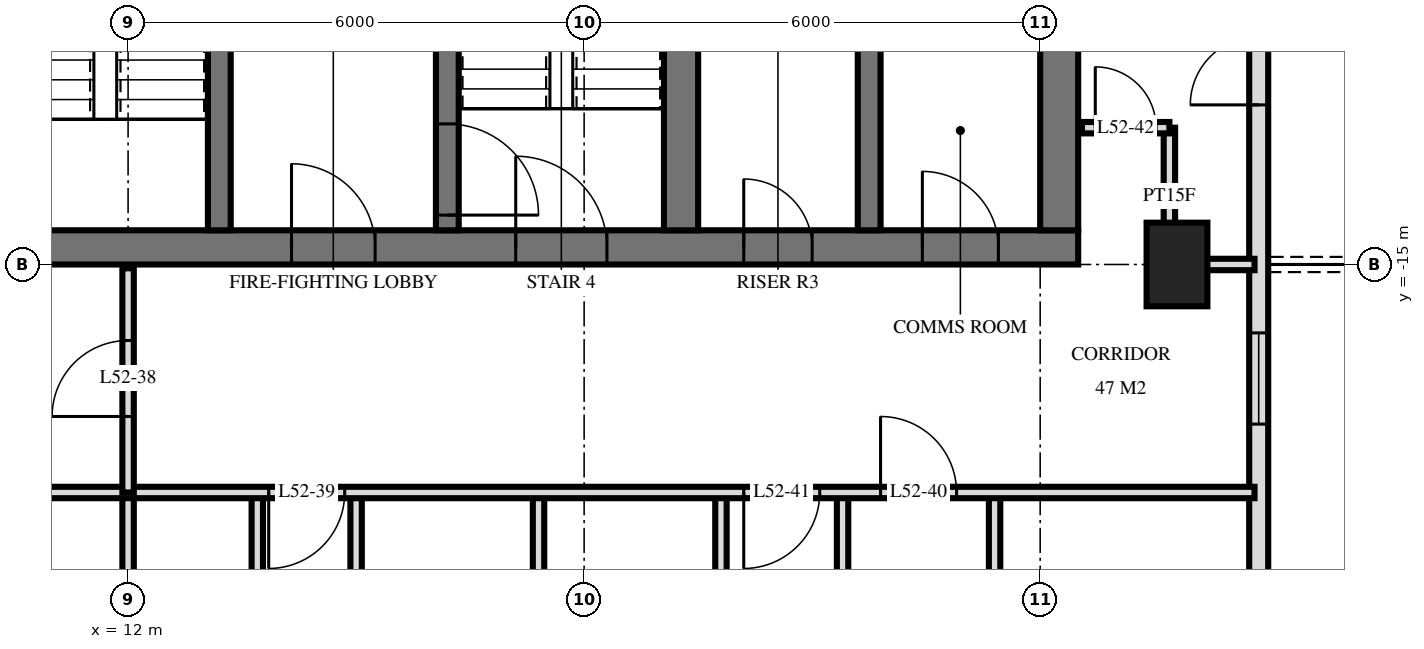
"""IFC4 building model, lengths in metres.
Left out: names, types, materials, properties, quantities, classifications, styles, units other than length and angle.
Written with IfcOpenShell. Run it as: python <this file> out.ifc"""

import sys

from ifc_helpers import new_model, si_unit, direction, frame, frame_2d, origin, origin_2d, place, context, subcontext, project, spatial, rectangle, extrude, element, fill, save


model = new_model("IFC4")
c1 = context("Model", 3, precision=1e-05, world=origin(), true_north=direction((0.0, 1.0)))
c2 = subcontext(c1, "Body", "Model", "MODEL_VIEW")
j1 = project(units=[si_unit("LENGTHUNIT", "METRE"), si_unit("PLANEANGLEUNIT", "RADIAN")], contexts=[c1])
p1 = place(None, origin())
s1 = spatial("IfcSite", under=j1, at=p1, CompositionType="ELEMENT")
p2 = place(p1, origin())
s2 = spatial("IfcBuilding", under=s1, at=p2, CompositionType="ELEMENT")
p3 = place(p2, frame((0.0, 0.0, 201.1)))
s3 = spatial("IfcBuildingStorey", under=s2, at=p3, CompositionType="ELEMENT", Elevation=201.1)
p4 = place(p3, frame((25.8, -15.0, 0.0), z_axis=(0.0, 0.0, 1.0), x_axis=(0.0, 1.0, 0.0)))
e1 = element("IfcColumn", 1, at=p4, inside=s3, PredefinedType="COLUMN", context=c2, shape_type="SweptSolid", body=[
    extrude(rectangle(XDim=1.1, YDim=0.8, at=origin_2d()), origin(), (0.0, 0.0, 1.0), 3.5),
])
p5 = place(p3, frame((10.0, -14.775, 0.0), z_axis=(0.0, 0.0, 1.0), x_axis=(1.0, 0.0, 0.0)))
e2 = element("IfcWall", 2, at=p5, inside=s3, PredefinedType="SHEAR", context=c2, shape_type="SweptSolid", body=[
    extrude(rectangle(XDim=14.5, YDim=0.45, at=frame_2d((7.25, 0.0))), origin(), (0.0, 0.0, 1.0), 3.5),
])
p6 = place(p5, frame((7.1, 0.0, 0.0)))
e3 = element("IfcOpeningElement", 3, at=p6, cuts=e2, PredefinedType="OPENING", context=c2, shape_type="SweptSolid", body=[
    extrude(rectangle(XDim=1.2, YDim=2.1, at=frame_2d((0.6, 1.05))), frame((0.0, 0.235, 0.0), z_axis=(0.0, -1.0, 0.0), x_axis=(1.0, 0.0, 0.0)), (0.0, 0.0, 1.0), 0.47),
])
p7 = place(p5, frame((4.15, 0.0, 0.0)))
e4 = element("IfcOpeningElement", 4, at=p7, cuts=e2, PredefinedType="OPENING", context=c2, shape_type="SweptSolid", body=[
    extrude(rectangle(XDim=1.1, YDim=2.1, at=frame_2d((0.55, 1.05))), frame((0.0, 0.235, 0.0), z_axis=(0.0, -1.0, 0.0), x_axis=(1.0, 0.0, 0.0)), (0.0, 0.0, 1.0), 0.47),
])
p8 = place(p5, frame((10.1, 0.0, 0.0)))
e5 = element("IfcOpeningElement", 5, at=p8, cuts=e2, PredefinedType="OPENING", context=c2, shape_type="SweptSolid", body=[
    extrude(rectangle(XDim=0.9, YDim=2.1, at=frame_2d((0.45, 1.05))), frame((0.0, 0.235, 0.0), z_axis=(0.0, -1.0, 0.0), x_axis=(1.0, 0.0, 0.0)), (0.0, 0.0, 1.0), 0.47),
])
p9 = place(p5, frame((12.45, 0.0, 0.0)))
e6 = element("IfcOpeningElement", 6, at=p9, cuts=e2, PredefinedType="OPENING", context=c2, shape_type="SweptSolid", body=[
    extrude(rectangle(XDim=1.0, YDim=2.1, at=frame_2d((0.5, 1.05))), frame((0.0, 0.235, 0.0), z_axis=(0.0, -1.0, 0.0), x_axis=(1.0, 0.0, 0.0)), (0.0, 0.0, 1.0), 0.47),
])
p10 = place(p3, frame((24.25, -14.55, 0.0), z_axis=(0.0, 0.0, 1.0), x_axis=(0.0, 1.0, 0.0)))
e7 = element("IfcWall", 7, at=p10, inside=s3, PredefinedType="SHEAR", context=c2, shape_type="SweptSolid", body=[
    extrude(rectangle(XDim=14.1, YDim=0.5, at=frame_2d((7.05, 0.0))), origin(), (0.0, 0.0, 1.0), 3.5),
])
p11 = place(p3, frame((13.2, -14.55, 0.0), z_axis=(0.0, 0.0, 1.0), x_axis=(0.0, 1.0, 0.0)))
e8 = element("IfcWall", 8, at=p11, inside=s3, PredefinedType="SHEAR", context=c2, shape_type="SweptSolid", body=[
    extrude(rectangle(XDim=5.4, YDim=0.3, at=frame_2d((2.7, 0.0))), origin(), (0.0, 0.0, 1.0), 3.5),
])
p12 = place(p11, frame((4.0, 0.0, 0.0)))
e9 = element("IfcOpeningElement", 9, at=p12, cuts=e8, PredefinedType="OPENING", context=c2, shape_type="SweptSolid", body=[
    extrude(rectangle(XDim=1.2, YDim=2.1, at=frame_2d((0.6, 1.05))), frame((0.0, 0.16, 0.0), z_axis=(0.0, -1.0, 0.0), x_axis=(1.0, 0.0, 0.0)), (0.0, 0.0, 1.0), 0.32),
])
p13 = place(p3, frame((16.2, -14.55, 0.0), z_axis=(0.0, 0.0, 1.0), x_axis=(0.0, 1.0, 0.0)))
e10 = element("IfcWall", 10, at=p13, inside=s3, PredefinedType="SHEAR", context=c2, shape_type="SweptSolid", body=[
    extrude(rectangle(XDim=5.4, YDim=0.3, at=frame_2d((2.7, 0.0))), origin(), (0.0, 0.0, 1.0), 3.5),
])
p14 = place(p13, frame((0.2, 0.0, 0.0)))
e11 = element("IfcOpeningElement", 11, at=p14, cuts=e10, PredefinedType="OPENING", context=c2, shape_type="SweptSolid", body=[
    extrude(rectangle(XDim=1.2, YDim=2.1, at=frame_2d((0.6, 1.05))), frame((0.0, 0.16, 0.0), z_axis=(0.0, -1.0, 0.0), x_axis=(1.0, 0.0, 0.0)), (0.0, 0.0, 1.0), 0.32),
])
p15 = place(p3, frame((19.275, -14.55, 0.0), z_axis=(0.0, 0.0, 1.0), x_axis=(0.0, 1.0, 0.0)))
e12 = element("IfcWall", 12, at=p15, inside=s3, PredefinedType="SHEAR", context=c2, shape_type="SweptSolid", body=[
    extrude(rectangle(XDim=5.4, YDim=0.45, at=frame_2d((2.7, 0.0))), origin(), (0.0, 0.0, 1.0), 3.5),
])
p16 = place(p3, frame((21.75, -14.55, 0.0), z_axis=(0.0, 0.0, 1.0), x_axis=(0.0, 1.0, 0.0)))
e13 = element("IfcWall", 13, at=p16, inside=s3, PredefinedType="SHEAR", context=c2, shape_type="SweptSolid", body=[
    extrude(rectangle(XDim=5.4, YDim=0.3, at=frame_2d((2.7, 0.0))), origin(), (0.0, 0.0, 1.0), 3.5),
])
p17 = place(p3, frame((26.875, -24.875, 0.0), z_axis=(0.0, 0.0, 1.0), x_axis=(0.0, 1.0, 0.0)))
e14 = element("IfcWall", 14, at=p17, inside=s3, PredefinedType="SOLIDWALL", context=c2, shape_type="SweptSolid", body=[
    extrude(rectangle(XDim=21.551, YDim=0.25, at=frame_2d((10.775, 0.0))), origin(), (0.0, 0.0, 1.0), 3.22),
])
p18 = place(p17, frame((0.425, 0.0, 0.0)))
e15 = element("IfcOpeningElement", 15, at=p18, cuts=e14, PredefinedType="OPENING", context=c2, shape_type="SweptSolid", body=[
    extrude(rectangle(XDim=1.8, YDim=2.4, at=frame_2d((0.9, 1.2))), frame((0.0, 0.135, 0.0), z_axis=(0.0, -1.0, 0.0), x_axis=(1.0, 0.0, 0.0)), (0.0, 0.0, 1.0), 0.27),
])
p19 = place(p17, frame((3.875, 0.0, 0.0)))
e16 = element("IfcOpeningElement", 16, at=p19, cuts=e14, PredefinedType="OPENING", context=c2, shape_type="SweptSolid", body=[
    extrude(rectangle(XDim=1.8, YDim=2.4, at=frame_2d((0.9, 1.2))), frame((0.0, 0.135, 0.0), z_axis=(0.0, -1.0, 0.0), x_axis=(1.0, 0.0, 0.0)), (0.0, 0.0, 1.0), 0.27),
])
p20 = place(p17, frame((7.775, 0.0, 0.9)))
e17 = element("IfcOpeningElement", 17, at=p20, cuts=e14, PredefinedType="OPENING", context=c2, shape_type="SweptSolid", body=[
    extrude(rectangle(XDim=1.2, YDim=1.5, at=frame_2d((0.6, 0.75))), frame((0.0, 0.135, 0.0), z_axis=(0.0, -1.0, 0.0), x_axis=(1.0, 0.0, 0.0)), (0.0, 0.0, 1.0), 0.27),
])
p21 = place(p17, frame((11.975, 0.0, 0.0)))
e18 = element("IfcOpeningElement", 18, at=p21, cuts=e14, PredefinedType="OPENING", context=c2, shape_type="SweptSolid", body=[
    extrude(rectangle(XDim=1.8, YDim=2.4, at=frame_2d((0.9, 1.2))), frame((0.0, 0.135, 0.0), z_axis=(0.0, -1.0, 0.0), x_axis=(1.0, 0.0, 0.0)), (0.0, 0.0, 1.0), 0.27),
])
p22 = place(p3, frame((25.7, -15.0, 0.0), z_axis=(0.0, 0.0, 1.0), x_axis=(0.0, 1.0, 0.0)))
e19 = element("IfcWall", 19, at=p22, inside=s3, PredefinedType="PARTITIONING", context=c2, shape_type="SweptSolid", body=[
    extrude(rectangle(XDim=1.8, YDim=0.15, at=frame_2d((0.9, 0.0))), origin(), (0.0, 0.0, 1.0), 3.22),
])
p23 = place(p3, frame((23.4, -22.2, 0.0), z_axis=(0.0, 0.0, 1.0), x_axis=(0.0, 1.0, 0.0)))
e20 = element("IfcWall", 20, at=p23, inside=s3, PredefinedType="PARTITIONING", context=c2, shape_type="SweptSolid", body=[
    extrude(rectangle(XDim=4.2, YDim=0.15, at=frame_2d((2.1, 0.0))), origin(), (0.0, 0.0, 1.0), 3.22),
])
p24 = place(p23, frame((1.62, 0.0, 0.0)))
e21 = element("IfcOpeningElement", 21, at=p24, cuts=e20, PredefinedType="OPENING", context=c2, shape_type="SweptSolid", body=[
    extrude(rectangle(XDim=1.0, YDim=2.1, at=frame_2d((0.5, 1.05))), frame((0.0, 0.085, 0.0), z_axis=(0.0, -1.0, 0.0), x_axis=(1.0, 0.0, 0.0)), (0.0, 0.0, 1.0), 0.17),
])
for number, where, z_axis, x_axis in (
    (22, (21.4, -22.2, 0.0), (0.0, 0.0, 1.0), (0.0, 1.0, 0.0)),
    (23, (19.8, -22.2, 0.0), (0.0, 0.0, 1.0), (0.0, 1.0, 0.0)),
    (24, (17.4, -22.2, 0.0), (0.0, 0.0, 1.0), (0.0, 1.0, 0.0)),
):
    element("IfcWall", number, at=place(p3, frame(where, z_axis=z_axis, x_axis=x_axis)), inside=s3, PredefinedType="PARTITIONING", context=c2, shape_type="SweptSolid", body=[
        extrude(rectangle(XDim=4.2, YDim=0.15, at=frame_2d((2.1, 0.0))), origin(), (0.0, 0.0, 1.0), 3.22),
    ])
p25 = place(p3, frame((15.0, -29.22, 0.0), z_axis=(0.0, 0.0, 1.0), x_axis=(0.0, 1.0, 0.0)))
e25 = element("IfcWall", 25, at=p25, inside=s3, PredefinedType="PARTITIONING", context=c2, shape_type="SweptSolid", body=[
    extrude(rectangle(XDim=11.22, YDim=0.15, at=frame_2d((5.61, 0.0))), origin(), (0.0, 0.0, 1.0), 3.22),
])
p26 = place(p3, frame((13.7, -22.2, 0.0), z_axis=(0.0, 0.0, 1.0), x_axis=(0.0, 1.0, 0.0)))
e26 = element("IfcWall", 26, at=p26, inside=s3, PredefinedType="PARTITIONING", context=c2, shape_type="SweptSolid", body=[
    extrude(rectangle(XDim=4.2, YDim=0.15, at=frame_2d((2.1, 0.0))), origin(), (0.0, 0.0, 1.0), 3.22),
])
p27 = place(p26, frame((1.68, 0.0, 0.0)))
e27 = element("IfcOpeningElement", 27, at=p27, cuts=e26, PredefinedType="OPENING", context=c2, shape_type="SweptSolid", body=[
    extrude(rectangle(XDim=0.8, YDim=2.1, at=frame_2d((0.4, 1.05))), frame((0.0, 0.085, 0.0), z_axis=(0.0, -1.0, 0.0), x_axis=(1.0, 0.0, 0.0)), (0.0, 0.0, 1.0), 0.17),
])
p28 = place(p3, frame((12.0, -18.0, 0.0), z_axis=(0.0, 0.0, 1.0), x_axis=(0.0, 1.0, 0.0)))
e28 = element("IfcWall", 28, at=p28, inside=s3, PredefinedType="PARTITIONING", context=c2, shape_type="SweptSolid", body=[
    extrude(rectangle(XDim=2.95, YDim=0.15, at=frame_2d((1.475, 0.0))), origin(), (0.0, 0.0, 1.0), 3.22),
])
p29 = place(p28, frame((1.0, 0.0, 0.0)))
e29 = element("IfcOpeningElement", 29, at=p29, cuts=e28, PredefinedType="OPENING", context=c2, shape_type="SweptSolid", body=[
    extrude(rectangle(XDim=1.0, YDim=2.1, at=frame_2d((0.5, 1.05))), frame((0.0, 0.085, 0.0), z_axis=(0.0, -1.0, 0.0), x_axis=(1.0, 0.0, 0.0)), (0.0, 0.0, 1.0), 0.17),
])
p30 = place(p3, frame((12.0, -29.22, 0.0), z_axis=(0.0, 0.0, 1.0), x_axis=(0.0, 1.0, 0.0)))
e30 = element("IfcWall", 30, at=p30, inside=s3, PredefinedType="PARTITIONING", context=c2, shape_type="SweptSolid", body=[
    extrude(rectangle(XDim=11.22, YDim=0.15, at=frame_2d((5.61, 0.0))), origin(), (0.0, 0.0, 1.0), 3.22),
])
p31 = place(p3, frame((-26.82, -18.0, 0.0), z_axis=(0.0, 0.0, 1.0), x_axis=(1.0, 0.0, 0.0)))
e31 = element("IfcWall", 31, at=p31, inside=s3, PredefinedType="PARTITIONING", context=c2, shape_type="SweptSolid", body=[
    extrude(rectangle(XDim=53.64, YDim=0.15, at=frame_2d((26.82, 0.0))), origin(), (0.0, 0.0, 1.0), 3.22),
])
p32 = place(p31, frame((11.97, 0.0, 0.0)))
e32 = element("IfcOpeningElement", 32, at=p32, cuts=e31, PredefinedType="OPENING", context=c2, shape_type="SweptSolid", body=[
    extrude(rectangle(XDim=1.0, YDim=2.1, at=frame_2d((0.5, 1.05))), frame((0.0, 0.085, 0.0), z_axis=(0.0, -1.0, 0.0), x_axis=(1.0, 0.0, 0.0)), (0.0, 0.0, 1.0), 0.17),
])
p33 = place(p31, frame((3.92, 0.0, 0.0)))
e33 = element("IfcOpeningElement", 33, at=p33, cuts=e31, PredefinedType="OPENING", context=c2, shape_type="SweptSolid", body=[
    extrude(rectangle(XDim=1.0, YDim=2.1, at=frame_2d((0.5, 1.05))), frame((0.0, 0.085, 0.0), z_axis=(0.0, -1.0, 0.0), x_axis=(1.0, 0.0, 0.0)), (0.0, 0.0, 1.0), 0.17),
])
p34 = place(p31, frame((5.72, 0.0, 0.0)))
e34 = element("IfcOpeningElement", 34, at=p34, cuts=e31, PredefinedType="OPENING", context=c2, shape_type="SweptSolid", body=[
    extrude(rectangle(XDim=1.0, YDim=2.1, at=frame_2d((0.5, 1.05))), frame((0.0, 0.085, 0.0), z_axis=(0.0, -1.0, 0.0), x_axis=(1.0, 0.0, 0.0)), (0.0, 0.0, 1.0), 0.17),
])
p35 = place(p31, frame((40.67, 0.0, 0.0)))
e35 = element("IfcOpeningElement", 35, at=p35, cuts=e31, PredefinedType="OPENING", context=c2, shape_type="SweptSolid", body=[
    extrude(rectangle(XDim=1.0, YDim=2.1, at=frame_2d((0.5, 1.05))), frame((0.0, 0.085, 0.0), z_axis=(0.0, -1.0, 0.0), x_axis=(1.0, 0.0, 0.0)), (0.0, 0.0, 1.0), 0.17),
])
p36 = place(p31, frame((48.72, 0.0, 0.0)))
e36 = element("IfcOpeningElement", 36, at=p36, cuts=e31, PredefinedType="OPENING", context=c2, shape_type="SweptSolid", body=[
    extrude(rectangle(XDim=1.0, YDim=2.1, at=frame_2d((0.5, 1.05))), frame((0.0, 0.085, 0.0), z_axis=(0.0, -1.0, 0.0), x_axis=(1.0, 0.0, 0.0)), (0.0, 0.0, 1.0), 0.17),
])
p37 = place(p31, frame((46.92, 0.0, 0.0)))
e37 = element("IfcOpeningElement", 37, at=p37, cuts=e31, PredefinedType="OPENING", context=c2, shape_type="SweptSolid", body=[
    extrude(rectangle(XDim=1.0, YDim=2.1, at=frame_2d((0.5, 1.05))), frame((0.0, 0.085, 0.0), z_axis=(0.0, -1.0, 0.0), x_axis=(1.0, 0.0, 0.0)), (0.0, 0.0, 1.0), 0.17),
])
p38 = place(p31, frame((17.32, 0.0, 0.0)))
e38 = element("IfcOpeningElement", 38, at=p38, cuts=e31, PredefinedType="OPENING", context=c2, shape_type="SweptSolid", body=[
    extrude(rectangle(XDim=1.0, YDim=2.1, at=frame_2d((0.5, 1.05))), frame((0.0, 0.085, 0.0), z_axis=(0.0, -1.0, 0.0), x_axis=(1.0, 0.0, 0.0)), (0.0, 0.0, 1.0), 0.17),
])
p39 = place(p31, frame((23.32, 0.0, 0.0)))
e39 = element("IfcOpeningElement", 39, at=p39, cuts=e31, PredefinedType="OPENING", context=c2, shape_type="SweptSolid", body=[
    extrude(rectangle(XDim=1.0, YDim=2.1, at=frame_2d((0.5, 1.05))), frame((0.0, 0.085, 0.0), z_axis=(0.0, -1.0, 0.0), x_axis=(1.0, 0.0, 0.0)), (0.0, 0.0, 1.0), 0.17),
])
p40 = place(p31, frame((29.32, 0.0, 0.0)))
e40 = element("IfcOpeningElement", 40, at=p40, cuts=e31, PredefinedType="OPENING", context=c2, shape_type="SweptSolid", body=[
    extrude(rectangle(XDim=1.0, YDim=2.1, at=frame_2d((0.5, 1.05))), frame((0.0, 0.085, 0.0), z_axis=(0.0, -1.0, 0.0), x_axis=(1.0, 0.0, 0.0)), (0.0, 0.0, 1.0), 0.17),
])
p41 = place(p31, frame((35.32, 0.0, 0.0)))
e41 = element("IfcOpeningElement", 41, at=p41, cuts=e31, PredefinedType="OPENING", context=c2, shape_type="SweptSolid", body=[
    extrude(rectangle(XDim=1.0, YDim=2.1, at=frame_2d((0.5, 1.05))), frame((0.0, 0.085, 0.0), z_axis=(0.0, -1.0, 0.0), x_axis=(1.0, 0.0, 0.0)), (0.0, 0.0, 1.0), 0.17),
])
p42 = place(p3, frame((25.7, -15.0, 0.0), z_axis=(0.0, 0.0, 1.0), x_axis=(1.0, 0.0, 0.0)))
e42 = element("IfcWall", 42, at=p42, inside=s3, PredefinedType="PARTITIONING", context=c2, shape_type="SweptSolid", body=[
    extrude(rectangle(XDim=1.12, YDim=0.15, at=frame_2d((0.56, 0.0))), origin(), (0.0, 0.0, 1.0), 3.22),
])
p43 = place(p3, frame((24.55, -13.2, 0.0), z_axis=(0.0, 0.0, 1.0), x_axis=(1.0, 0.0, 0.0)))
e43 = element("IfcWall", 43, at=p43, inside=s3, PredefinedType="PARTITIONING", context=c2, shape_type="SweptSolid", body=[
    extrude(rectangle(XDim=1.15, YDim=0.15, at=frame_2d((0.575, 0.0))), origin(), (0.0, 0.0, 1.0), 3.22),
])
p44 = place(p43, frame((0.175, 0.0, 0.0)))
e44 = element("IfcOpeningElement", 44, at=p44, cuts=e43, PredefinedType="OPENING", context=c2, shape_type="SweptSolid", body=[
    extrude(rectangle(XDim=0.8, YDim=2.1, at=frame_2d((0.4, 1.05))), frame((0.0, 0.085, 0.0), z_axis=(0.0, -1.0, 0.0), x_axis=(1.0, 0.0, 0.0)), (0.0, 0.0, 1.0), 0.17),
])
p45 = place(p20, origin())
e45 = element("IfcWindow", 45, at=p45, inside=s3, PartitioningType="SINGLE_PANEL", PredefinedType="WINDOW", context=c2, shape_type="SweptSolid", body=[
    extrude(rectangle(XDim=1.2, YDim=1.5, at=frame_2d((0.6, 0.75))), frame((0.0, 0.03, 0.0), z_axis=(0.0, -1.0, 0.0), x_axis=(1.0, 0.0, 0.0)), (0.0, 0.0, 1.0), 0.06),
])
fill(e17, e45)
p46 = place(p21, origin())
e46 = element("IfcDoor", 46, at=p46, inside=s3, OperationType="DOUBLE_DOOR_SINGLE_SWING", PredefinedType="DOOR", context=c2, shape_type="SweptSolid", body=[
    extrude(rectangle(XDim=1.8, YDim=2.4, at=frame_2d((0.9, 1.2))), frame((0.0, 0.025, 0.0), z_axis=(0.0, -1.0, 0.0), x_axis=(1.0, 0.0, 0.0)), (0.0, 0.0, 1.0), 0.05),
])
fill(e18, e46)
p47 = place(p6, origin())
e47 = element("IfcDoor", 47, at=p47, inside=s3, OperationType="SINGLE_SWING_RIGHT", PredefinedType="DOOR", context=c2, shape_type="SweptSolid", body=[
    extrude(rectangle(XDim=1.2, YDim=2.1, at=frame_2d((0.6, 1.05))), frame((0.0, 0.025, 0.0), z_axis=(0.0, -1.0, 0.0), x_axis=(1.0, 0.0, 0.0)), (0.0, 0.0, 1.0), 0.05),
])
fill(e3, e47)
p48 = place(p7, origin())
e48 = element("IfcDoor", 48, at=p48, inside=s3, OperationType="SINGLE_SWING_RIGHT", PredefinedType="DOOR", context=c2, shape_type="SweptSolid", body=[
    extrude(rectangle(XDim=1.1, YDim=2.1, at=frame_2d((0.55, 1.05))), frame((0.0, 0.025, 0.0), z_axis=(0.0, -1.0, 0.0), x_axis=(1.0, 0.0, 0.0)), (0.0, 0.0, 1.0), 0.05),
])
fill(e4, e48)
p49 = place(p8, origin())
e49 = element("IfcDoor", 49, at=p49, inside=s3, OperationType="SINGLE_SWING_RIGHT", PredefinedType="DOOR", context=c2, shape_type="SweptSolid", body=[
    extrude(rectangle(XDim=0.9, YDim=2.1, at=frame_2d((0.45, 1.05))), frame((0.0, 0.025, 0.0), z_axis=(0.0, -1.0, 0.0), x_axis=(1.0, 0.0, 0.0)), (0.0, 0.0, 1.0), 0.05),
])
fill(e5, e49)
p50 = place(p9, origin())
e50 = element("IfcDoor", 50, at=p50, inside=s3, OperationType="SINGLE_SWING_RIGHT", PredefinedType="DOOR", context=c2, shape_type="SweptSolid", body=[
    extrude(rectangle(XDim=1.0, YDim=2.1, at=frame_2d((0.5, 1.05))), frame((0.0, 0.025, 0.0), z_axis=(0.0, -1.0, 0.0), x_axis=(1.0, 0.0, 0.0)), (0.0, 0.0, 1.0), 0.05),
])
fill(e6, e50)
p51 = place(p14, frame((0.6, 0.0, 0.0), z_axis=(0.0, 0.0, 1.0), x_axis=(-1.0, 0.0, 0.0)))
e51 = element("IfcDoor", 51, at=p51, inside=s3, OperationType="SINGLE_SWING_LEFT", PredefinedType="DOOR", context=c2, shape_type="SweptSolid", body=[
    extrude(rectangle(XDim=1.2, YDim=2.1, at=frame_2d((0.0, 1.05))), frame((0.0, -0.025, 0.0), z_axis=(0.0, 1.0, 0.0), x_axis=(-1.0, 0.0, 0.0)), (0.0, 0.0, 1.0), 0.05),
])
fill(e11, e51)
p52 = place(p29, origin())
e52 = element("IfcDoor", 52, at=p52, inside=s3, OperationType="SINGLE_SWING_RIGHT", PredefinedType="DOOR", context=c2, shape_type="SweptSolid", body=[
    extrude(rectangle(XDim=1.0, YDim=2.1, at=frame_2d((0.5, 1.05))), frame((0.0, 0.025, 0.0), z_axis=(0.0, -1.0, 0.0), x_axis=(1.0, 0.0, 0.0)), (0.0, 0.0, 1.0), 0.05),
])
fill(e29, e52)
p53 = place(p35, frame((0.5, 0.0, 0.0), z_axis=(0.0, 0.0, 1.0), x_axis=(-1.0, 0.0, 0.0)))
e53 = element("IfcDoor", 53, at=p53, inside=s3, OperationType="SINGLE_SWING_LEFT", PredefinedType="DOOR", context=c2, shape_type="SweptSolid", body=[
    extrude(rectangle(XDim=1.0, YDim=2.1, at=frame_2d((0.0, 1.05))), frame((0.0, -0.025, 0.0), z_axis=(0.0, 1.0, 0.0), x_axis=(-1.0, 0.0, 0.0)), (0.0, 0.0, 1.0), 0.05),
])
fill(e35, e53)
p54 = place(p36, origin())
e54 = element("IfcDoor", 54, at=p54, inside=s3, OperationType="SINGLE_SWING_RIGHT", PredefinedType="DOOR", context=c2, shape_type="SweptSolid", body=[
    extrude(rectangle(XDim=1.0, YDim=2.1, at=frame_2d((0.5, 1.05))), frame((0.0, 0.025, 0.0), z_axis=(0.0, -1.0, 0.0), x_axis=(1.0, 0.0, 0.0)), (0.0, 0.0, 1.0), 0.05),
])
fill(e36, e54)
p55 = place(p37, frame((0.5, 0.0, 0.0), z_axis=(0.0, 0.0, 1.0), x_axis=(-1.0, 0.0, 0.0)))
e55 = element("IfcDoor", 55, at=p55, inside=s3, OperationType="SINGLE_SWING_LEFT", PredefinedType="DOOR", context=c2, shape_type="SweptSolid", body=[
    extrude(rectangle(XDim=1.0, YDim=2.1, at=frame_2d((0.0, 1.05))), frame((0.0, -0.025, 0.0), z_axis=(0.0, 1.0, 0.0), x_axis=(-1.0, 0.0, 0.0)), (0.0, 0.0, 1.0), 0.05),
])
fill(e37, e55)
p56 = place(p44, origin())
e56 = element("IfcDoor", 56, at=p56, inside=s3, OperationType="SINGLE_SWING_RIGHT", PredefinedType="DOOR", context=c2, shape_type="SweptSolid", body=[
    extrude(rectangle(XDim=0.8, YDim=2.1, at=frame_2d((0.4, 1.05))), frame((0.0, 0.025, 0.0), z_axis=(0.0, -1.0, 0.0), x_axis=(1.0, 0.0, 0.0)), (0.0, 0.0, 1.0), 0.05),
])
fill(e44, e56)
save(model, sys.argv[1])
